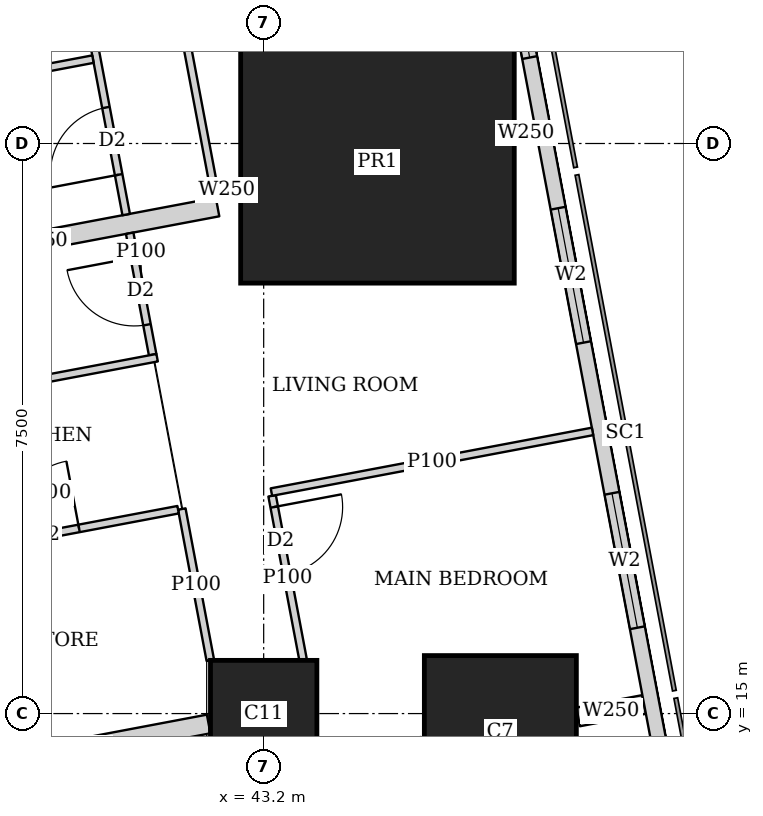
"""IFC4 building model, lengths in metres.
Left out: names, types, materials, properties, quantities, classifications, styles, units other than length and angle.
Written with IfcOpenShell. Run it as: python <this file> out.ifc"""

import sys

from ifc_helpers import new_model, si_unit, direction, frame, frame_2d, origin, origin_2d, place, context, subcontext, project, spatial, rectangle, extrude, element, fill, save


model = new_model("IFC4")
c1 = context("Model", 3, precision=1e-05, world=origin(), true_north=direction((0.0, 1.0)))
c2 = subcontext(c1, "Body", "Model", "MODEL_VIEW")
j1 = project(units=[si_unit("LENGTHUNIT", "METRE"), si_unit("PLANEANGLEUNIT", "RADIAN")], contexts=[c1])
p1 = place(None, origin())
s1 = spatial("IfcSite", under=j1, at=p1, CompositionType="ELEMENT")
p2 = place(p1, origin())
s2 = spatial("IfcBuilding", under=s1, at=p2, CompositionType="ELEMENT")
p3 = place(p2, frame((0.0, 0.0, 251.6)))
s3 = spatial("IfcBuildingStorey", under=s2, at=p3, CompositionType="ELEMENT", Elevation=251.6)
p4 = place(p3, frame((43.2, 15.0, 0.0), z_axis=(0.0, 0.0, 1.0), x_axis=(1.0, 0.0, 0.0)))
e1 = element("IfcColumn", 1, at=p4, inside=s3, PredefinedType="COLUMN", context=c2, shape_type="SweptSolid", body=[
    extrude(rectangle(XDim=1.4, YDim=1.4, at=origin_2d()), origin(), (0.0, 0.0, 1.0), 3.75),
])
p5 = place(p3, frame((46.314, 14.763, 0.0), z_axis=(0.0, 0.0, 1.0), x_axis=(1.0, 0.0, 0.0)))
e2 = element("IfcColumn", 2, at=p5, inside=s3, PredefinedType="COLUMN", context=c2, shape_type="SweptSolid", body=[
    extrude(rectangle(XDim=2.0, YDim=2.0, at=origin_2d()), origin(), (0.0, 0.0, 1.0), 3.75),
])
p6 = place(p3, frame((44.697, 22.263, 0.0), z_axis=(0.0, 0.0, 1.0), x_axis=(1.0, 0.0, 0.0)))
e3 = element("IfcColumn", 3, at=p6, inside=s3, PredefinedType="COLUMN", context=c2, shape_type="SweptSolid", body=[
    extrude(rectangle(XDim=3.6, YDim=3.2, at=origin_2d()), origin(), (0.0, 0.0, 1.0), 3.75),
])
p7 = place(p3, frame((49.684, 7.832, 0.0), z_axis=(0.0, 0.0, 1.0), x_axis=(-0.185616669694, 0.982622232565, 0.0)))
e4 = element("IfcWall", 4, at=p7, inside=s3, PredefinedType="SOLIDWALL", context=c2, shape_type="SweptSolid", body=[
    extrude(rectangle(XDim=36.0, YDim=0.2, at=frame_2d((18.0, 0.0))), origin(), (0.0, 0.0, 1.0), 3.5),
])
p8 = place(p7, frame((2.518, 0.0, 0.9)))
e5 = element("IfcOpeningElement", 5, at=p8, cuts=e4, PredefinedType="OPENING", context=c2, shape_type="SweptSolid", body=[
    extrude(rectangle(XDim=2.4, YDim=1.5, at=frame_2d((1.2, 0.75))), frame((0.0, 0.11, 0.0), z_axis=(0.0, -1.0, 0.0), x_axis=(1.0, 0.0, 0.0)), (0.0, 0.0, 1.0), 0.22),
])
p9 = place(p7, frame((8.444, 0.0, 0.9)))
e6 = element("IfcOpeningElement", 6, at=p9, cuts=e4, PredefinedType="OPENING", context=c2, shape_type="SweptSolid", body=[
    extrude(rectangle(XDim=1.8, YDim=1.5, at=frame_2d((0.9, 0.75))), frame((0.0, 0.11, 0.0), z_axis=(0.0, -1.0, 0.0), x_axis=(1.0, 0.0, 0.0)), (0.0, 0.0, 1.0), 0.22),
])
p10 = place(p7, frame((12.261, 0.0, 0.9)))
e7 = element("IfcOpeningElement", 7, at=p10, cuts=e4, PredefinedType="OPENING", context=c2, shape_type="SweptSolid", body=[
    extrude(rectangle(XDim=1.8, YDim=1.5, at=frame_2d((0.9, 0.75))), frame((0.0, 0.11, 0.0), z_axis=(0.0, -1.0, 0.0), x_axis=(1.0, 0.0, 0.0)), (0.0, 0.0, 1.0), 0.22),
])
p11 = place(p7, frame((16.078, 0.0, 0.9)))
e8 = element("IfcOpeningElement", 8, at=p11, cuts=e4, PredefinedType="OPENING", context=c2, shape_type="SweptSolid", body=[
    extrude(rectangle(XDim=1.8, YDim=1.5, at=frame_2d((0.9, 0.75))), frame((0.0, 0.11, 0.0), z_axis=(0.0, -1.0, 0.0), x_axis=(1.0, 0.0, 0.0)), (0.0, 0.0, 1.0), 0.22),
])
p12 = place(p7, frame((19.894, 0.0, 0.9)))
e9 = element("IfcOpeningElement", 9, at=p12, cuts=e4, PredefinedType="OPENING", context=c2, shape_type="SweptSolid", body=[
    extrude(rectangle(XDim=1.8, YDim=1.5, at=frame_2d((0.9, 0.75))), frame((0.0, 0.11, 0.0), z_axis=(0.0, -1.0, 0.0), x_axis=(1.0, 0.0, 0.0)), (0.0, 0.0, 1.0), 0.22),
])
p13 = place(p7, frame((23.71, 0.0, 0.9)))
e10 = element("IfcOpeningElement", 10, at=p13, cuts=e4, PredefinedType="OPENING", context=c2, shape_type="SweptSolid", body=[
    extrude(rectangle(XDim=1.8, YDim=1.5, at=frame_2d((0.9, 0.75))), frame((0.0, 0.11, 0.0), z_axis=(0.0, -1.0, 0.0), x_axis=(1.0, 0.0, 0.0)), (0.0, 0.0, 1.0), 0.22),
])
p14 = place(p7, frame((27.526, 0.0, 0.9)))
e11 = element("IfcOpeningElement", 11, at=p14, cuts=e4, PredefinedType="OPENING", context=c2, shape_type="SweptSolid", body=[
    extrude(rectangle(XDim=1.8, YDim=1.5, at=frame_2d((0.9, 0.75))), frame((0.0, 0.11, 0.0), z_axis=(0.0, -1.0, 0.0), x_axis=(1.0, 0.0, 0.0)), (0.0, 0.0, 1.0), 0.22),
])
p15 = place(p7, frame((32.046, 0.0, 0.9)))
e12 = element("IfcOpeningElement", 12, at=p15, cuts=e4, PredefinedType="OPENING", context=c2, shape_type="SweptSolid", body=[
    extrude(rectangle(XDim=1.8, YDim=1.5, at=frame_2d((0.9, 0.75))), frame((0.0, 0.11, 0.0), z_axis=(0.0, -1.0, 0.0), x_axis=(1.0, 0.0, 0.0)), (0.0, 0.0, 1.0), 0.22),
])
p16 = place(p3, frame((33.781, 42.186, 0.0), z_axis=(0.0, 0.0, 1.0), x_axis=(0.185593518645, -0.9826266055, 0.0)))
e13 = element("IfcWall", 13, at=p16, inside=s3, PredefinedType="SOLIDWALL", context=c2, shape_type="SweptSolid", body=[
    extrude(rectangle(XDim=35.961, YDim=0.15, at=frame_2d((17.98, 0.0))), origin(), (0.0, 0.0, 1.0), 2.5),
])
p17 = place(p16, frame((7.183, 0.0, 0.0)))
e14 = element("IfcOpeningElement", 14, at=p17, cuts=e13, PredefinedType="OPENING", context=c2, shape_type="SweptSolid", body=[
    extrude(rectangle(XDim=1.0, YDim=2.1, at=frame_2d((0.5, 1.05))), frame((0.0, 0.085, 0.0), z_axis=(0.0, -1.0, 0.0), x_axis=(1.0, 0.0, 0.0)), (0.0, 0.0, 1.0), 0.17),
])
p18 = place(p16, frame((11.76, 0.0, 0.0)))
e15 = element("IfcOpeningElement", 15, at=p18, cuts=e13, PredefinedType="OPENING", context=c2, shape_type="SweptSolid", body=[
    extrude(rectangle(XDim=1.0, YDim=2.1, at=frame_2d((0.5, 1.05))), frame((0.0, 0.085, 0.0), z_axis=(0.0, -1.0, 0.0), x_axis=(1.0, 0.0, 0.0)), (0.0, 0.0, 1.0), 0.17),
])
p19 = place(p16, frame((23.863, 0.0, 0.0)))
e16 = element("IfcOpeningElement", 16, at=p19, cuts=e13, PredefinedType="OPENING", context=c2, shape_type="SweptSolid", body=[
    extrude(rectangle(XDim=1.0, YDim=2.1, at=frame_2d((0.5, 1.05))), frame((0.0, 0.085, 0.0), z_axis=(0.0, -1.0, 0.0), x_axis=(1.0, 0.0, 0.0)), (0.0, 0.0, 1.0), 0.17),
])
p20 = place(p16, frame((30.502, 0.0, 0.0)))
e17 = element("IfcOpeningElement", 17, at=p20, cuts=e13, PredefinedType="OPENING", context=c2, shape_type="SweptSolid", body=[
    extrude(rectangle(XDim=1.0, YDim=2.1, at=frame_2d((0.5, 1.05))), frame((0.0, 0.085, 0.0), z_axis=(0.0, -1.0, 0.0), x_axis=(1.0, 0.0, 0.0)), (0.0, 0.0, 1.0), 0.17),
])
p21 = place(p3, frame((41.157, 29.273, 0.0), z_axis=(0.0, 0.0, 1.0), x_axis=(0.18542464283, -0.982658486877, 0.0)))
e18 = element("IfcWall", 18, at=p21, inside=s3, PredefinedType="PARTITIONING", context=c2, shape_type="SweptSolid", body=[
    extrude(rectangle(XDim=7.421, YDim=0.1, at=frame_2d((3.71, 0.0))), origin(), (0.0, 0.0, 1.0), 2.5),
])
p22 = place(p21, frame((0.8, 0.0, 0.0)))
e19 = element("IfcOpeningElement", 19, at=p22, cuts=e18, PredefinedType="OPENING", context=c2, shape_type="SweptSolid", body=[
    extrude(rectangle(XDim=0.9, YDim=2.1, at=frame_2d((0.45, 1.05))), frame((0.0, 0.06, 0.0), z_axis=(0.0, -1.0, 0.0), x_axis=(1.0, 0.0, 0.0)), (0.0, 0.0, 1.0), 0.12),
])
p23 = place(p21, frame((4.126, 0.0, 0.0)))
e20 = element("IfcOpeningElement", 20, at=p23, cuts=e18, PredefinedType="OPENING", context=c2, shape_type="SweptSolid", body=[
    extrude(rectangle(XDim=0.9, YDim=2.1, at=frame_2d((0.45, 1.05))), frame((0.0, 0.06, 0.0), z_axis=(0.0, -1.0, 0.0), x_axis=(1.0, 0.0, 0.0)), (0.0, 0.0, 1.0), 0.12),
])
p24 = place(p3, frame((39.997, 28.942, 0.0), z_axis=(0.0, 0.0, 1.0), x_axis=(0.185686318797, -0.982609073341, 0.0)))
e21 = element("IfcWall", 21, at=p24, inside=s3, PredefinedType="PARTITIONING", context=c2, shape_type="SweptSolid", body=[
    extrude(rectangle(XDim=7.508, YDim=0.1, at=frame_2d((3.754, 0.0))), origin(), (0.0, 0.0, 1.0), 2.5),
])
p25 = place(p24, frame((0.576, 0.0, 0.0)))
e22 = element("IfcOpeningElement", 22, at=p25, cuts=e21, PredefinedType="OPENING", context=c2, shape_type="SweptSolid", body=[
    extrude(rectangle(XDim=0.9, YDim=2.1, at=frame_2d((0.45, 1.05))), frame((0.0, 0.06, 0.0), z_axis=(0.0, -1.0, 0.0), x_axis=(1.0, 0.0, 0.0)), (0.0, 0.0, 1.0), 0.12),
])
p26 = place(p24, frame((4.166, 0.0, 0.0)))
e23 = element("IfcOpeningElement", 23, at=p26, cuts=e21, PredefinedType="OPENING", context=c2, shape_type="SweptSolid", body=[
    extrude(rectangle(XDim=0.9, YDim=2.1, at=frame_2d((0.45, 1.05))), frame((0.0, 0.06, 0.0), z_axis=(0.0, -1.0, 0.0), x_axis=(1.0, 0.0, 0.0)), (0.0, 0.0, 1.0), 0.12),
])
p27 = place(p24, frame((2.483, 0.0, 0.0)))
e24 = element("IfcOpeningElement", 24, at=p27, cuts=e21, PredefinedType="OPENING", context=c2, shape_type="SweptSolid", body=[
    extrude(rectangle(XDim=0.9, YDim=2.1, at=frame_2d((0.45, 1.05))), frame((0.0, 0.06, 0.0), z_axis=(0.0, -1.0, 0.0), x_axis=(1.0, 0.0, 0.0)), (0.0, 0.0, 1.0), 0.12),
])
p28 = place(p24, frame((6.074, 0.0, 0.0)))
e25 = element("IfcOpeningElement", 25, at=p28, cuts=e21, PredefinedType="OPENING", context=c2, shape_type="SweptSolid", body=[
    extrude(rectangle(XDim=0.9, YDim=2.1, at=frame_2d((0.45, 1.05))), frame((0.0, 0.06, 0.0), z_axis=(0.0, -1.0, 0.0), x_axis=(1.0, 0.0, 0.0)), (0.0, 0.0, 1.0), 0.12),
])
p29 = place(p3, frame((40.954, 23.61, 0.0), z_axis=(0.0, 0.0, 1.0), x_axis=(-0.98264808502, -0.18547975902, 0.0)))
e26 = element("IfcWall", 26, at=p29, inside=s3, PredefinedType="PARTITIONING", context=c2, shape_type="SweptSolid", body=[
    extrude(rectangle(XDim=3.526, YDim=0.1, at=frame_2d((1.763, 0.0))), origin(), (0.0, 0.0, 1.0), 2.5),
])
p30 = place(p3, frame((41.437, 21.319, 0.0), z_axis=(0.0, 0.0, 1.0), x_axis=(0.185793689589, -0.982588777113, 0.0)))
e27 = element("IfcWall", 27, at=p30, inside=s3, PredefinedType="PARTITIONING", context=c2, shape_type="SweptSolid", body=[
    extrude(rectangle(XDim=1.625, YDim=0.1, at=frame_2d((0.813, 0.0))), origin(), (0.0, 0.0, 1.0), 3.5),
])
p31 = place(p30, frame((0.325, 0.0, 0.0)))
e28 = element("IfcOpeningElement", 28, at=p31, cuts=e27, PredefinedType="OPENING", context=c2, shape_type="SweptSolid", body=[
    extrude(rectangle(XDim=0.9, YDim=2.1, at=frame_2d((0.45, 1.05))), frame((0.0, 0.06, 0.0), z_axis=(0.0, -1.0, 0.0), x_axis=(1.0, 0.0, 0.0)), (0.0, 0.0, 1.0), 0.12),
])
p32 = place(p3, frame((41.798, 19.682, 0.0), z_axis=(0.0, 0.0, 1.0), x_axis=(-0.982681091817, -0.185304807776, 0.0)))
e29 = element("IfcWall", 29, at=p32, inside=s3, PredefinedType="PARTITIONING", context=c2, shape_type="SweptSolid", body=[
    extrude(rectangle(XDim=3.626, YDim=0.1, at=frame_2d((1.813, 0.0))), origin(), (0.0, 0.0, 1.0), 3.5),
])
p33 = place(p3, frame((43.311, 17.865, 0.0), z_axis=(0.0, 0.0, 1.0), x_axis=(0.185572140257, -0.982630643101, 0.0)))
e30 = element("IfcWall", 30, at=p33, inside=s3, PredefinedType="PARTITIONING", context=c2, shape_type="SweptSolid", body=[
    extrude(rectangle(XDim=2.193, YDim=0.1, at=frame_2d((1.097, 0.0))), origin(), (0.0, 0.0, 1.0), 3.5),
])
p34 = place(p33, frame((0.15, 0.0, 0.0)))
e31 = element("IfcOpeningElement", 31, at=p34, cuts=e30, PredefinedType="OPENING", context=c2, shape_type="SweptSolid", body=[
    extrude(rectangle(XDim=0.9, YDim=2.1, at=frame_2d((0.45, 1.05))), frame((0.0, 0.06, 0.0), z_axis=(0.0, -1.0, 0.0), x_axis=(1.0, 0.0, 0.0)), (0.0, 0.0, 1.0), 0.12),
])
p35 = place(p3, frame((42.123, 17.691, 0.0), z_axis=(0.0, 0.0, 1.0), x_axis=(0.185183804812, -0.98270390171, 0.0)))
e32 = element("IfcWall", 32, at=p35, inside=s3, PredefinedType="PARTITIONING", context=c2, shape_type="SweptSolid", body=[
    extrude(rectangle(XDim=2.025, YDim=0.1, at=frame_2d((1.012, 0.0))), origin(), (0.0, 0.0, 1.0), 3.5),
])
p36 = place(p3, frame((47.527, 18.712, 0.0), z_axis=(0.0, 0.0, 1.0), x_axis=(-0.982633535512, -0.185556823879, 0.0)))
e33 = element("IfcWall", 33, at=p36, inside=s3, PredefinedType="PARTITIONING", context=c2, shape_type="SweptSolid", body=[
    extrude(rectangle(XDim=4.3, YDim=0.1, at=frame_2d((2.15, 0.0))), origin(), (0.0, 0.0, 1.0), 2.5),
])
p37 = place(p3, frame((42.074, 17.682, 0.0), z_axis=(0.0, 0.0, 1.0), x_axis=(-0.982660701716, -0.185412904897, 0.0)))
e34 = element("IfcWall", 34, at=p37, inside=s3, PredefinedType="PARTITIONING", context=c2, shape_type="SweptSolid", body=[
    extrude(rectangle(XDim=3.526, YDim=0.1, at=frame_2d((1.763, 0.0))), origin(), (0.0, 0.0, 1.0), 3.5),
])
p38 = place(p37, frame((1.326, 0.0, 0.0)))
e35 = element("IfcOpeningElement", 35, at=p38, cuts=e34, PredefinedType="OPENING", context=c2, shape_type="SweptSolid", body=[
    extrude(rectangle(XDim=0.9, YDim=2.1, at=frame_2d((0.45, 1.05))), frame((0.0, 0.06, 0.0), z_axis=(0.0, -1.0, 0.0), x_axis=(1.0, 0.0, 0.0)), (0.0, 0.0, 1.0), 0.12),
])
p39 = place(p3, frame((46.782, 22.657, 0.0), z_axis=(0.0, 0.0, 1.0), x_axis=(-0.982104607121, -0.188336243648, 0.0)))
e36 = element("IfcWall", 36, at=p39, inside=s3, PredefinedType="SOLIDWALL", context=c2, shape_type="SweptSolid", body=[
    extrude(rectangle(XDim=0.266, YDim=0.25, at=frame_2d((0.133, 0.0))), origin(), (0.0, 0.0, 1.0), 3.5),
])
p40 = place(p3, frame((42.873, 21.918, 0.0), z_axis=(0.0, 0.0, 1.0), x_axis=(-0.982431406936, -0.186624035603, 0.0)))
e37 = element("IfcWall", 37, at=p40, inside=s3, PredefinedType="SOLIDWALL", context=c2, shape_type="SweptSolid", body=[
    extrude(rectangle(XDim=0.322, YDim=0.25, at=frame_2d((0.161, 0.0))), origin(), (0.0, 0.0, 1.0), 2.5),
])
p41 = place(p3, frame((42.593, 21.665, 0.0), z_axis=(0.0, 0.0, 1.0), x_axis=(-0.982635807605, -0.185544791394, 0.0)))
e38 = element("IfcWall", 38, at=p41, inside=s3, PredefinedType="SOLIDWALL", context=c2, shape_type="SweptSolid", body=[
    extrude(rectangle(XDim=4.775, YDim=0.25, at=frame_2d((2.388, 0.0))), origin(), (0.0, 0.0, 1.0), 2.5),
])
p42 = place(p3, frame((48.206, 15.12, 0.0), z_axis=(0.0, 0.0, 1.0), x_axis=(-0.982608419258, -0.185689780017, 0.0)))
e39 = element("IfcWall", 39, at=p42, inside=s3, PredefinedType="SOLIDWALL", context=c2, shape_type="SweptSolid", body=[
    extrude(rectangle(XDim=0.884, YDim=0.25, at=frame_2d((0.442, 0.0))), origin(), (0.0, 0.0, 1.0), 3.5),
])
p43 = place(p3, frame((42.476, 14.863, 0.0), z_axis=(0.0, 0.0, 1.0), x_axis=(-0.982603567712, -0.185715450942, 0.0)))
e40 = element("IfcWall", 40, at=p43, inside=s3, PredefinedType="SOLIDWALL", context=c2, shape_type="SweptSolid", body=[
    extrude(rectangle(XDim=3.398, YDim=0.25, at=frame_2d((1.699, 0.0))), origin(), (0.0, 0.0, 1.0), 3.5),
])
p44 = place(p9, origin())
e41 = element("IfcWindow", 41, at=p44, inside=s3, PartitioningType="SINGLE_PANEL", PredefinedType="WINDOW", context=c2, shape_type="SweptSolid", body=[
    extrude(rectangle(XDim=1.8, YDim=1.5, at=frame_2d((0.9, 0.75))), frame((0.0, 0.03, 0.0), z_axis=(0.0, -1.0, 0.0), x_axis=(1.0, 0.0, 0.0)), (0.0, 0.0, 1.0), 0.06),
])
fill(e6, e41)
p45 = place(p10, origin())
e42 = element("IfcWindow", 42, at=p45, inside=s3, PartitioningType="SINGLE_PANEL", PredefinedType="WINDOW", context=c2, shape_type="SweptSolid", body=[
    extrude(rectangle(XDim=1.8, YDim=1.5, at=frame_2d((0.9, 0.75))), frame((0.0, 0.03, 0.0), z_axis=(0.0, -1.0, 0.0), x_axis=(1.0, 0.0, 0.0)), (0.0, 0.0, 1.0), 0.06),
])
fill(e7, e42)
p46 = place(p11, origin())
e43 = element("IfcWindow", 43, at=p46, inside=s3, PartitioningType="SINGLE_PANEL", PredefinedType="WINDOW", context=c2, shape_type="SweptSolid", body=[
    extrude(rectangle(XDim=1.8, YDim=1.5, at=frame_2d((0.9, 0.75))), frame((0.0, 0.03, 0.0), z_axis=(0.0, -1.0, 0.0), x_axis=(1.0, 0.0, 0.0)), (0.0, 0.0, 1.0), 0.06),
])
fill(e8, e43)
p47 = place(p28, origin())
e44 = element("IfcDoor", 44, at=p47, inside=s3, OperationType="SINGLE_SWING_LEFT", PredefinedType="DOOR", context=c2, shape_type="SweptSolid", body=[
    extrude(rectangle(XDim=0.9, YDim=2.1, at=frame_2d((0.45, 1.05))), frame((0.0, 0.025, 0.0), z_axis=(0.0, -1.0, 0.0), x_axis=(1.0, 0.0, 0.0)), (0.0, 0.0, 1.0), 0.05),
])
fill(e25, e44)
p48 = place(p31, origin())
e45 = element("IfcDoor", 45, at=p48, inside=s3, OperationType="SINGLE_SWING_RIGHT", PredefinedType="DOOR", context=c2, shape_type="SweptSolid", body=[
    extrude(rectangle(XDim=0.9, YDim=2.1, at=frame_2d((0.45, 1.05))), frame((0.0, 0.025, 0.0), z_axis=(0.0, -1.0, 0.0), x_axis=(1.0, 0.0, 0.0)), (0.0, 0.0, 1.0), 0.05),
])
fill(e28, e45)
p49 = place(p34, origin())
e46 = element("IfcDoor", 46, at=p49, inside=s3, OperationType="SINGLE_SWING_LEFT", PredefinedType="DOOR", context=c2, shape_type="SweptSolid", body=[
    extrude(rectangle(XDim=0.9, YDim=2.1, at=frame_2d((0.45, 1.05))), frame((0.0, 0.025, 0.0), z_axis=(0.0, -1.0, 0.0), x_axis=(1.0, 0.0, 0.0)), (0.0, 0.0, 1.0), 0.05),
])
fill(e31, e46)
p50 = place(p38, origin())
e47 = element("IfcDoor", 47, at=p50, inside=s3, OperationType="SINGLE_SWING_RIGHT", PredefinedType="DOOR", context=c2, shape_type="SweptSolid", body=[
    extrude(rectangle(XDim=0.9, YDim=2.1, at=frame_2d((0.45, 1.05))), frame((0.0, 0.025, 0.0), z_axis=(0.0, -1.0, 0.0), x_axis=(1.0, 0.0, 0.0)), (0.0, 0.0, 1.0), 0.05),
])
fill(e35, e47)
save(model, sys.argv[1])
